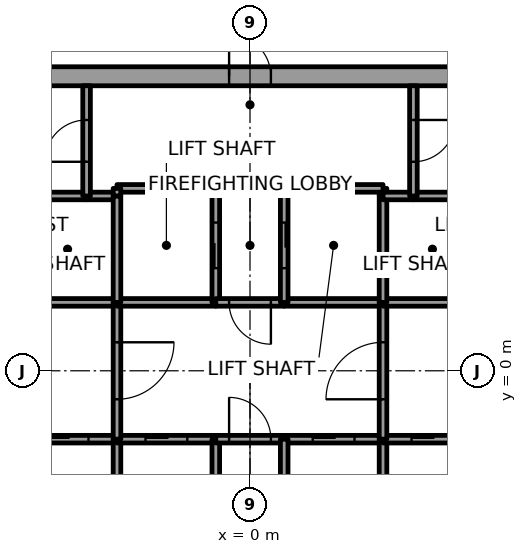
"""IFC4 building model, lengths in metres.
Left out: names, types, materials, properties, quantities, classifications, styles, units other than length and angle.
Written with IfcOpenShell. Run it as: python <this file> out.ifc"""

import sys

from ifc_helpers import new_model, si_unit, direction, frame, frame_2d, origin, place, context, subcontext, project, spatial, rectangle, extrude, element, fill, save


model = new_model("IFC4")
c1 = context("Model", 3, precision=1e-05, world=origin(), true_north=direction((0.0, 1.0)))
c2 = subcontext(c1, "Body", "Model", "MODEL_VIEW")
j1 = project(units=[si_unit("LENGTHUNIT", "METRE"), si_unit("PLANEANGLEUNIT", "RADIAN")], contexts=[c1])
p1 = place(None, origin())
s1 = spatial("IfcSite", under=j1, at=p1, CompositionType="ELEMENT")
p2 = place(p1, origin())
s2 = spatial("IfcBuilding", under=s1, at=p2, CompositionType="ELEMENT")
p3 = place(p2, frame((0.0, 0.0, 73.9)))
s3 = spatial("IfcBuildingStorey", under=s2, at=p3, CompositionType="ELEMENT", Elevation=73.9)
p4 = place(p3, frame((-11.0, 7.75, 0.0), z_axis=(0.0, 0.0, 1.0), x_axis=(1.0, 0.0, 0.0)))
e1 = element("IfcWall", 1, at=p4, inside=s3, PredefinedType="SHEAR", context=c2, shape_type="SweptSolid", body=[
    extrude(rectangle(XDim=22.0, YDim=0.5, at=frame_2d((11.0, 0.0))), origin(), (0.0, 0.0, 1.0), 3.7),
])
p5 = place(p4, frame((10.45, 0.0, 0.0)))
e2 = element("IfcOpeningElement", 2, at=p5, cuts=e1, PredefinedType="OPENING", context=c2, shape_type="SweptSolid", body=[
    extrude(rectangle(XDim=1.1, YDim=2.1, at=frame_2d((0.55, 1.05))), frame((0.0, 0.25, 0.0), z_axis=(0.0, -1.0, 0.0), x_axis=(1.0, 0.0, 0.0)), (0.0, 0.0, 1.0), 0.5),
])
p6 = place(p3, frame((-6.1, -1.8, 0.0), z_axis=(0.0, 0.0, 1.0), x_axis=(1.0, 0.0, 0.0)))
e3 = element("IfcWall", 3, at=p6, inside=s3, PredefinedType="SOLIDWALL", context=c2, shape_type="SweptSolid", body=[
    extrude(rectangle(XDim=2.6, YDim=0.2, at=frame_2d((1.3, 0.0))), origin(), (0.0, 0.0, 1.0), 3.55),
])
p7 = place(p6, frame((0.75, 0.0, 0.0)))
e4 = element("IfcOpeningElement", 4, at=p7, cuts=e3, PredefinedType="OPENING", context=c2, shape_type="SweptSolid", body=[
    extrude(rectangle(XDim=1.1, YDim=2.1, at=frame_2d((0.55, 1.05))), frame((0.0, 0.1, 0.0), z_axis=(0.0, -1.0, 0.0), x_axis=(1.0, 0.0, 0.0)), (0.0, 0.0, 1.0), 0.2),
])
p8 = place(p3, frame((-3.5, 1.8, 0.0), z_axis=(0.0, 0.0, 1.0), x_axis=(-1.0, 0.0, 0.0)))
e5 = element("IfcWall", 5, at=p8, inside=s3, PredefinedType="SOLIDWALL", context=c2, shape_type="SweptSolid", body=[
    extrude(rectangle(XDim=2.6, YDim=0.2, at=frame_2d((1.3, 0.0))), origin(), (0.0, 0.0, 1.0), 3.55),
])
p9 = place(p3, frame((-4.3, 4.6, 0.0), z_axis=(0.0, 0.0, 1.0), x_axis=(-1.0, 0.0, 0.0)))
e6 = element("IfcWall", 6, at=p9, inside=s3, PredefinedType="SOLIDWALL", context=c2, shape_type="SweptSolid", body=[
    extrude(rectangle(XDim=1.8, YDim=0.2, at=frame_2d((0.9, 0.0))), origin(), (0.0, 0.0, 1.0), 3.55),
])
p10 = place(p3, frame((-3.5, 4.6, 0.0), z_axis=(0.0, 0.0, 1.0), x_axis=(-1.0, 0.0, 0.0)))
e7 = element("IfcWall", 7, at=p10, inside=s3, PredefinedType="SOLIDWALL", context=c2, shape_type="SweptSolid", body=[
    extrude(rectangle(XDim=0.8, YDim=0.2, at=frame_2d((0.4, 0.0))), origin(), (0.0, 0.0, 1.0), 3.55),
])
p11 = place(p3, frame((-4.3, 4.6, 0.0), z_axis=(0.0, 0.0, 1.0), x_axis=(0.0, 1.0, 0.0)))
e8 = element("IfcWall", 8, at=p11, inside=s3, PredefinedType="SOLIDWALL", context=c2, shape_type="SweptSolid", body=[
    extrude(rectangle(XDim=2.9, YDim=0.2, at=frame_2d((1.45, 0.0))), origin(), (0.0, 0.0, 1.0), 3.55),
])
p12 = place(p11, frame((0.9, 0.0, 0.0)))
e9 = element("IfcOpeningElement", 9, at=p12, cuts=e8, PredefinedType="OPENING", context=c2, shape_type="SweptSolid", body=[
    extrude(rectangle(XDim=1.1, YDim=2.1, at=frame_2d((0.55, 1.05))), frame((0.0, 0.1, 0.0), z_axis=(0.0, -1.0, 0.0), x_axis=(1.0, 0.0, 0.0)), (0.0, 0.0, 1.0), 0.2),
])
p13 = place(p3, frame((-3.5, -4.6, 0.0), z_axis=(0.0, 0.0, 1.0), x_axis=(0.0, 1.0, 0.0)))
e10 = element("IfcWall", 10, at=p13, inside=s3, PredefinedType="SOLIDWALL", context=c2, shape_type="SweptSolid", body=[
    extrude(rectangle(XDim=2.8, YDim=0.2, at=frame_2d((1.4, 0.0))), origin(), (0.0, 0.0, 1.0), 3.55),
])
p14 = place(p3, frame((-3.5, -1.8, 0.0), z_axis=(0.0, 0.0, 1.0), x_axis=(1.0, 0.0, 0.0)))
e11 = element("IfcWall", 11, at=p14, inside=s3, PredefinedType="SOLIDWALL", context=c2, shape_type="SweptSolid", body=[
    extrude(rectangle(XDim=2.6, YDim=0.2, at=frame_2d((1.3, 0.0))), origin(), (0.0, 0.0, 1.0), 3.55),
])
p15 = place(p14, frame((0.75, 0.0, 0.0)))
e12 = element("IfcOpeningElement", 12, at=p15, cuts=e11, PredefinedType="OPENING", context=c2, shape_type="SweptSolid", body=[
    extrude(rectangle(XDim=1.1, YDim=2.1, at=frame_2d((0.55, 1.05))), frame((0.0, 0.1, 0.0), z_axis=(0.0, -1.0, 0.0), x_axis=(1.0, 0.0, 0.0)), (0.0, 0.0, 1.0), 0.2),
])
p16 = place(p3, frame((-3.5, 1.8, 0.0), z_axis=(0.0, 0.0, 1.0), x_axis=(0.0, -1.0, 0.0)))
e13 = element("IfcWall", 13, at=p16, inside=s3, PredefinedType="SOLIDWALL", context=c2, shape_type="SweptSolid", body=[
    extrude(rectangle(XDim=3.6, YDim=0.2, at=frame_2d((1.8, 0.0))), origin(), (0.0, 0.0, 1.0), 3.55),
])
p17 = place(p16, frame((1.05, 0.0, 0.0)))
e14 = element("IfcOpeningElement", 14, at=p17, cuts=e13, PredefinedType="OPENING", context=c2, shape_type="SweptSolid", body=[
    extrude(rectangle(XDim=1.5, YDim=2.1, at=frame_2d((0.75, 1.05))), frame((0.0, 0.1, 0.0), z_axis=(0.0, -1.0, 0.0), x_axis=(1.0, 0.0, 0.0)), (0.0, 0.0, 1.0), 0.2),
])
p18 = place(p3, frame((-0.9, 1.8, 0.0), z_axis=(0.0, 0.0, 1.0), x_axis=(-1.0, 0.0, 0.0)))
e15 = element("IfcWall", 15, at=p18, inside=s3, PredefinedType="SOLIDWALL", context=c2, shape_type="SweptSolid", body=[
    extrude(rectangle(XDim=2.6, YDim=0.2, at=frame_2d((1.3, 0.0))), origin(), (0.0, 0.0, 1.0), 3.55),
])
p19 = place(p3, frame((-3.5, 4.6, 0.0), z_axis=(0.0, 0.0, 1.0), x_axis=(0.0, -1.0, 0.0)))
e16 = element("IfcWall", 16, at=p19, inside=s3, PredefinedType="SOLIDWALL", context=c2, shape_type="SweptSolid", body=[
    extrude(rectangle(XDim=2.8, YDim=0.2, at=frame_2d((1.4, 0.0))), origin(), (0.0, 0.0, 1.0), 3.55),
])
p20 = place(p3, frame((-0.9, 1.8, 0.0), z_axis=(0.0, 0.0, 1.0), x_axis=(0.0, 1.0, 0.0)))
e17 = element("IfcWall", 17, at=p20, inside=s3, PredefinedType="SOLIDWALL", context=c2, shape_type="SweptSolid", body=[
    extrude(rectangle(XDim=3.0, YDim=0.2, at=frame_2d((1.5, 0.0))), origin(), (0.0, 0.0, 1.0), 3.55),
])
p21 = place(p20, frame((0.9, 0.0, 0.0)))
e18 = element("IfcOpeningElement", 18, at=p21, cuts=e17, PredefinedType="OPENING", context=c2, shape_type="SweptSolid", body=[
    extrude(rectangle(XDim=1.2, YDim=2.1, at=frame_2d((0.6, 1.05))), frame((0.0, 0.1, 0.0), z_axis=(0.0, -1.0, 0.0), x_axis=(1.0, 0.0, 0.0)), (0.0, 0.0, 1.0), 0.2),
])
p22 = place(p3, frame((-0.9, 4.8, 0.0), z_axis=(0.0, 0.0, 1.0), x_axis=(-1.0, 0.0, 0.0)))
e19 = element("IfcWall", 19, at=p22, inside=s3, PredefinedType="SOLIDWALL", context=c2, shape_type="SweptSolid", body=[
    extrude(rectangle(XDim=2.6, YDim=0.2, at=frame_2d((1.3, 0.0))), origin(), (0.0, 0.0, 1.0), 3.55),
])
p23 = place(p3, frame((-3.5, 4.8, 0.0), z_axis=(0.0, 0.0, 1.0), x_axis=(0.0, -1.0, 0.0)))
e20 = element("IfcWall", 20, at=p23, inside=s3, PredefinedType="SOLIDWALL", context=c2, shape_type="SweptSolid", body=[
    extrude(rectangle(XDim=0.2, YDim=0.2, at=frame_2d((0.1, 0.0))), origin(), (0.0, 0.0, 1.0), 3.55),
])
p24 = place(p3, frame((-0.9, -4.6, 0.0), z_axis=(0.0, 0.0, 1.0), x_axis=(0.0, 1.0, 0.0)))
e21 = element("IfcWall", 21, at=p24, inside=s3, PredefinedType="SOLIDWALL", context=c2, shape_type="SweptSolid", body=[
    extrude(rectangle(XDim=2.8, YDim=0.2, at=frame_2d((1.4, 0.0))), origin(), (0.0, 0.0, 1.0), 3.55),
])
p25 = place(p3, frame((-0.9, -1.8, 0.0), z_axis=(0.0, 0.0, 1.0), x_axis=(1.0, 0.0, 0.0)))
e22 = element("IfcWall", 22, at=p25, inside=s3, PredefinedType="SOLIDWALL", context=c2, shape_type="SweptSolid", body=[
    extrude(rectangle(XDim=1.8, YDim=0.2, at=frame_2d((0.9, 0.0))), origin(), (0.0, 0.0, 1.0), 3.55),
])
p26 = place(p25, frame((0.35, 0.0, 0.0)))
e23 = element("IfcOpeningElement", 23, at=p26, cuts=e22, PredefinedType="OPENING", context=c2, shape_type="SweptSolid", body=[
    extrude(rectangle(XDim=1.1, YDim=2.1, at=frame_2d((0.55, 1.05))), frame((0.0, 0.1, 0.0), z_axis=(0.0, -1.0, 0.0), x_axis=(1.0, 0.0, 0.0)), (0.0, 0.0, 1.0), 0.2),
])
p27 = place(p3, frame((0.9, 1.8, 0.0), z_axis=(0.0, 0.0, 1.0), x_axis=(-1.0, 0.0, 0.0)))
e24 = element("IfcWall", 24, at=p27, inside=s3, PredefinedType="SOLIDWALL", context=c2, shape_type="SweptSolid", body=[
    extrude(rectangle(XDim=1.8, YDim=0.2, at=frame_2d((0.9, 0.0))), origin(), (0.0, 0.0, 1.0), 3.55),
])
p28 = place(p27, frame((0.35, 0.0, 0.0)))
e25 = element("IfcOpeningElement", 25, at=p28, cuts=e24, PredefinedType="OPENING", context=c2, shape_type="SweptSolid", body=[
    extrude(rectangle(XDim=1.1, YDim=2.1, at=frame_2d((0.55, 1.05))), frame((0.0, 0.1, 0.0), z_axis=(0.0, -1.0, 0.0), x_axis=(1.0, 0.0, 0.0)), (0.0, 0.0, 1.0), 0.2),
])
p29 = place(p3, frame((0.9, -1.8, 0.0), z_axis=(0.0, 0.0, 1.0), x_axis=(1.0, 0.0, 0.0)))
e26 = element("IfcWall", 26, at=p29, inside=s3, PredefinedType="SOLIDWALL", context=c2, shape_type="SweptSolid", body=[
    extrude(rectangle(XDim=2.6, YDim=0.2, at=frame_2d((1.3, 0.0))), origin(), (0.0, 0.0, 1.0), 3.55),
])
p30 = place(p29, frame((0.75, 0.0, 0.0)))
e27 = element("IfcOpeningElement", 27, at=p30, cuts=e26, PredefinedType="OPENING", context=c2, shape_type="SweptSolid", body=[
    extrude(rectangle(XDim=1.1, YDim=2.1, at=frame_2d((0.55, 1.05))), frame((0.0, 0.1, 0.0), z_axis=(0.0, -1.0, 0.0), x_axis=(1.0, 0.0, 0.0)), (0.0, 0.0, 1.0), 0.2),
])
p31 = place(p3, frame((0.9, -1.8, 0.0), z_axis=(0.0, 0.0, 1.0), x_axis=(0.0, -1.0, 0.0)))
e28 = element("IfcWall", 28, at=p31, inside=s3, PredefinedType="SOLIDWALL", context=c2, shape_type="SweptSolid", body=[
    extrude(rectangle(XDim=2.8, YDim=0.2, at=frame_2d((1.4, 0.0))), origin(), (0.0, 0.0, 1.0), 3.55),
])
p32 = place(p3, frame((3.5, 1.8, 0.0), z_axis=(0.0, 0.0, 1.0), x_axis=(-1.0, 0.0, 0.0)))
e29 = element("IfcWall", 29, at=p32, inside=s3, PredefinedType="SOLIDWALL", context=c2, shape_type="SweptSolid", body=[
    extrude(rectangle(XDim=2.6, YDim=0.2, at=frame_2d((1.3, 0.0))), origin(), (0.0, 0.0, 1.0), 3.55),
])
p33 = place(p3, frame((3.5, 4.6, 0.0), z_axis=(0.0, 0.0, 1.0), x_axis=(0.0, 1.0, 0.0)))
e30 = element("IfcWall", 30, at=p33, inside=s3, PredefinedType="SOLIDWALL", context=c2, shape_type="SweptSolid", body=[
    extrude(rectangle(XDim=0.2, YDim=0.2, at=frame_2d((0.1, 0.0))), origin(), (0.0, 0.0, 1.0), 3.55),
])
p34 = place(p3, frame((3.5, 4.8, 0.0), z_axis=(0.0, 0.0, 1.0), x_axis=(-1.0, 0.0, 0.0)))
e31 = element("IfcWall", 31, at=p34, inside=s3, PredefinedType="SOLIDWALL", context=c2, shape_type="SweptSolid", body=[
    extrude(rectangle(XDim=2.6, YDim=0.2, at=frame_2d((1.3, 0.0))), origin(), (0.0, 0.0, 1.0), 3.55),
])
p35 = place(p3, frame((0.9, 4.8, 0.0), z_axis=(0.0, 0.0, 1.0), x_axis=(0.0, -1.0, 0.0)))
e32 = element("IfcWall", 32, at=p35, inside=s3, PredefinedType="SOLIDWALL", context=c2, shape_type="SweptSolid", body=[
    extrude(rectangle(XDim=3.0, YDim=0.2, at=frame_2d((1.5, 0.0))), origin(), (0.0, 0.0, 1.0), 3.55),
])
p36 = place(p35, frame((0.9, 0.0, 0.0)))
e33 = element("IfcOpeningElement", 33, at=p36, cuts=e32, PredefinedType="OPENING", context=c2, shape_type="SweptSolid", body=[
    extrude(rectangle(XDim=1.2, YDim=2.1, at=frame_2d((0.6, 1.05))), frame((0.0, 0.1, 0.0), z_axis=(0.0, -1.0, 0.0), x_axis=(1.0, 0.0, 0.0)), (0.0, 0.0, 1.0), 0.2),
])
p37 = place(p3, frame((3.5, -4.6, 0.0), z_axis=(0.0, 0.0, 1.0), x_axis=(0.0, 1.0, 0.0)))
e34 = element("IfcWall", 34, at=p37, inside=s3, PredefinedType="SOLIDWALL", context=c2, shape_type="SweptSolid", body=[
    extrude(rectangle(XDim=2.8, YDim=0.2, at=frame_2d((1.4, 0.0))), origin(), (0.0, 0.0, 1.0), 3.55),
])
p38 = place(p3, frame((3.5, -1.8, 0.0), z_axis=(0.0, 0.0, 1.0), x_axis=(1.0, 0.0, 0.0)))
e35 = element("IfcWall", 35, at=p38, inside=s3, PredefinedType="SOLIDWALL", context=c2, shape_type="SweptSolid", body=[
    extrude(rectangle(XDim=2.6, YDim=0.2, at=frame_2d((1.3, 0.0))), origin(), (0.0, 0.0, 1.0), 3.55),
])
p39 = place(p38, frame((0.75, 0.0, 0.0)))
e36 = element("IfcOpeningElement", 36, at=p39, cuts=e35, PredefinedType="OPENING", context=c2, shape_type="SweptSolid", body=[
    extrude(rectangle(XDim=1.1, YDim=2.1, at=frame_2d((0.55, 1.05))), frame((0.0, 0.1, 0.0), z_axis=(0.0, -1.0, 0.0), x_axis=(1.0, 0.0, 0.0)), (0.0, 0.0, 1.0), 0.2),
])
p40 = place(p3, frame((3.5, -1.8, 0.0), z_axis=(0.0, 0.0, 1.0), x_axis=(0.0, 1.0, 0.0)))
e37 = element("IfcWall", 37, at=p40, inside=s3, PredefinedType="SOLIDWALL", context=c2, shape_type="SweptSolid", body=[
    extrude(rectangle(XDim=3.6, YDim=0.2, at=frame_2d((1.8, 0.0))), origin(), (0.0, 0.0, 1.0), 3.55),
])
p41 = place(p40, frame((1.05, 0.0, 0.0)))
e38 = element("IfcOpeningElement", 38, at=p41, cuts=e37, PredefinedType="OPENING", context=c2, shape_type="SweptSolid", body=[
    extrude(rectangle(XDim=1.5, YDim=2.1, at=frame_2d((0.75, 1.05))), frame((0.0, 0.1, 0.0), z_axis=(0.0, -1.0, 0.0), x_axis=(1.0, 0.0, 0.0)), (0.0, 0.0, 1.0), 0.2),
])
p42 = place(p3, frame((6.1, 1.8, 0.0), z_axis=(0.0, 0.0, 1.0), x_axis=(-1.0, 0.0, 0.0)))
e39 = element("IfcWall", 39, at=p42, inside=s3, PredefinedType="SOLIDWALL", context=c2, shape_type="SweptSolid", body=[
    extrude(rectangle(XDim=2.6, YDim=0.2, at=frame_2d((1.3, 0.0))), origin(), (0.0, 0.0, 1.0), 3.55),
])
p43 = place(p3, frame((3.5, 1.8, 0.0), z_axis=(0.0, 0.0, 1.0), x_axis=(0.0, 1.0, 0.0)))
e40 = element("IfcWall", 40, at=p43, inside=s3, PredefinedType="SOLIDWALL", context=c2, shape_type="SweptSolid", body=[
    extrude(rectangle(XDim=2.8, YDim=0.2, at=frame_2d((1.4, 0.0))), origin(), (0.0, 0.0, 1.0), 3.55),
])
p44 = place(p3, frame((4.3, 4.6, 0.0), z_axis=(0.0, 0.0, 1.0), x_axis=(-1.0, 0.0, 0.0)))
e41 = element("IfcWall", 41, at=p44, inside=s3, PredefinedType="SOLIDWALL", context=c2, shape_type="SweptSolid", body=[
    extrude(rectangle(XDim=0.8, YDim=0.2, at=frame_2d((0.4, 0.0))), origin(), (0.0, 0.0, 1.0), 3.55),
])
p45 = place(p3, frame((6.1, 4.6, 0.0), z_axis=(0.0, 0.0, 1.0), x_axis=(-1.0, 0.0, 0.0)))
e42 = element("IfcWall", 42, at=p45, inside=s3, PredefinedType="SOLIDWALL", context=c2, shape_type="SweptSolid", body=[
    extrude(rectangle(XDim=1.8, YDim=0.2, at=frame_2d((0.9, 0.0))), origin(), (0.0, 0.0, 1.0), 3.55),
])
p46 = place(p3, frame((4.3, 7.5, 0.0), z_axis=(0.0, 0.0, 1.0), x_axis=(0.0, -1.0, 0.0)))
e43 = element("IfcWall", 43, at=p46, inside=s3, PredefinedType="SOLIDWALL", context=c2, shape_type="SweptSolid", body=[
    extrude(rectangle(XDim=2.9, YDim=0.2, at=frame_2d((1.45, 0.0))), origin(), (0.0, 0.0, 1.0), 3.55),
])
p47 = place(p46, frame((0.9, 0.0, 0.0)))
e44 = element("IfcOpeningElement", 44, at=p47, cuts=e43, PredefinedType="OPENING", context=c2, shape_type="SweptSolid", body=[
    extrude(rectangle(XDim=1.1, YDim=2.1, at=frame_2d((0.55, 1.05))), frame((0.0, 0.1, 0.0), z_axis=(0.0, -1.0, 0.0), x_axis=(1.0, 0.0, 0.0)), (0.0, 0.0, 1.0), 0.2),
])
p48 = place(p7, origin())
e45 = element("IfcDoor", 45, at=p48, inside=s3, OperationType="SLIDING_TO_LEFT", PredefinedType="DOOR", context=c2, shape_type="SweptSolid", body=[
    extrude(rectangle(XDim=1.1, YDim=2.1, at=frame_2d((0.55, 1.05))), frame((0.0, 0.025, 0.0), z_axis=(0.0, -1.0, 0.0), x_axis=(1.0, 0.0, 0.0)), (0.0, 0.0, 1.0), 0.05),
])
fill(e4, e45)
p49 = place(p15, origin())
e46 = element("IfcDoor", 46, at=p49, inside=s3, OperationType="SLIDING_TO_LEFT", PredefinedType="DOOR", context=c2, shape_type="SweptSolid", body=[
    extrude(rectangle(XDim=1.1, YDim=2.1, at=frame_2d((0.55, 1.05))), frame((0.0, 0.025, 0.0), z_axis=(0.0, -1.0, 0.0), x_axis=(1.0, 0.0, 0.0)), (0.0, 0.0, 1.0), 0.05),
])
fill(e12, e46)
p50 = place(p30, origin())
e47 = element("IfcDoor", 47, at=p50, inside=s3, OperationType="SLIDING_TO_LEFT", PredefinedType="DOOR", context=c2, shape_type="SweptSolid", body=[
    extrude(rectangle(XDim=1.1, YDim=2.1, at=frame_2d((0.55, 1.05))), frame((0.0, 0.025, 0.0), z_axis=(0.0, -1.0, 0.0), x_axis=(1.0, 0.0, 0.0)), (0.0, 0.0, 1.0), 0.05),
])
fill(e27, e47)
p51 = place(p39, origin())
e48 = element("IfcDoor", 48, at=p51, inside=s3, OperationType="SLIDING_TO_RIGHT", PredefinedType="DOOR", context=c2, shape_type="SweptSolid", body=[
    extrude(rectangle(XDim=1.1, YDim=2.1, at=frame_2d((0.55, 1.05))), frame((0.0, 0.025, 0.0), z_axis=(0.0, -1.0, 0.0), x_axis=(1.0, 0.0, 0.0)), (0.0, 0.0, 1.0), 0.05),
])
fill(e36, e48)
p52 = place(p21, origin())
e49 = element("IfcDoor", 49, at=p52, inside=s3, OperationType="SLIDING_TO_RIGHT", PredefinedType="DOOR", context=c2, shape_type="SweptSolid", body=[
    extrude(rectangle(XDim=1.2, YDim=2.1, at=frame_2d((0.6, 1.05))), frame((0.0, 0.025, 0.0), z_axis=(0.0, -1.0, 0.0), x_axis=(1.0, 0.0, 0.0)), (0.0, 0.0, 1.0), 0.05),
])
fill(e18, e49)
p53 = place(p36, origin())
e50 = element("IfcDoor", 50, at=p53, inside=s3, OperationType="SLIDING_TO_LEFT", PredefinedType="DOOR", context=c2, shape_type="SweptSolid", body=[
    extrude(rectangle(XDim=1.2, YDim=2.1, at=frame_2d((0.6, 1.05))), frame((0.0, 0.025, 0.0), z_axis=(0.0, -1.0, 0.0), x_axis=(1.0, 0.0, 0.0)), (0.0, 0.0, 1.0), 0.05),
])
fill(e33, e50)
p54 = place(p17, origin())
e51 = element("IfcDoor", 51, at=p54, inside=s3, OperationType="DOUBLE_DOOR_SINGLE_SWING", PredefinedType="DOOR", context=c2, shape_type="SweptSolid", body=[
    extrude(rectangle(XDim=1.5, YDim=2.1, at=frame_2d((0.75, 1.05))), frame((0.0, 0.025, 0.0), z_axis=(0.0, -1.0, 0.0), x_axis=(1.0, 0.0, 0.0)), (0.0, 0.0, 1.0), 0.05),
])
fill(e14, e51)
p55 = place(p41, origin())
e52 = element("IfcDoor", 52, at=p55, inside=s3, OperationType="DOUBLE_DOOR_SINGLE_SWING", PredefinedType="DOOR", context=c2, shape_type="SweptSolid", body=[
    extrude(rectangle(XDim=1.5, YDim=2.1, at=frame_2d((0.75, 1.05))), frame((0.0, 0.025, 0.0), z_axis=(0.0, -1.0, 0.0), x_axis=(1.0, 0.0, 0.0)), (0.0, 0.0, 1.0), 0.05),
])
fill(e38, e52)
p56 = place(p28, origin())
e53 = element("IfcDoor", 53, at=p56, inside=s3, OperationType="SINGLE_SWING_RIGHT", PredefinedType="DOOR", context=c2, shape_type="SweptSolid", body=[
    extrude(rectangle(XDim=1.1, YDim=2.1, at=frame_2d((0.55, 1.05))), frame((0.0, 0.025, 0.0), z_axis=(0.0, -1.0, 0.0), x_axis=(1.0, 0.0, 0.0)), (0.0, 0.0, 1.0), 0.05),
])
fill(e25, e53)
p57 = place(p26, origin())
e54 = element("IfcDoor", 54, at=p57, inside=s3, OperationType="SINGLE_SWING_RIGHT", PredefinedType="DOOR", context=c2, shape_type="SweptSolid", body=[
    extrude(rectangle(XDim=1.1, YDim=2.1, at=frame_2d((0.55, 1.05))), frame((0.0, 0.025, 0.0), z_axis=(0.0, -1.0, 0.0), x_axis=(1.0, 0.0, 0.0)), (0.0, 0.0, 1.0), 0.05),
])
fill(e23, e54)
p58 = place(p12, origin())
e55 = element("IfcDoor", 55, at=p58, inside=s3, OperationType="SINGLE_SWING_RIGHT", PredefinedType="DOOR", context=c2, shape_type="SweptSolid", body=[
    extrude(rectangle(XDim=1.1, YDim=2.1, at=frame_2d((0.55, 1.05))), frame((0.0, 0.025, 0.0), z_axis=(0.0, -1.0, 0.0), x_axis=(1.0, 0.0, 0.0)), (0.0, 0.0, 1.0), 0.05),
])
fill(e9, e55)
p59 = place(p47, origin())
e56 = element("IfcDoor", 56, at=p59, inside=s3, OperationType="SINGLE_SWING_LEFT", PredefinedType="DOOR", context=c2, shape_type="SweptSolid", body=[
    extrude(rectangle(XDim=1.1, YDim=2.1, at=frame_2d((0.55, 1.05))), frame((0.0, 0.025, 0.0), z_axis=(0.0, -1.0, 0.0), x_axis=(1.0, 0.0, 0.0)), (0.0, 0.0, 1.0), 0.05),
])
fill(e44, e56)
p60 = place(p5, origin())
e57 = element("IfcDoor", 57, at=p60, inside=s3, OperationType="SINGLE_SWING_RIGHT", PredefinedType="DOOR", context=c2, shape_type="SweptSolid", body=[
    extrude(rectangle(XDim=1.1, YDim=2.1, at=frame_2d((0.55, 1.05))), frame((0.0, 0.025, 0.0), z_axis=(0.0, -1.0, 0.0), x_axis=(1.0, 0.0, 0.0)), (0.0, 0.0, 1.0), 0.05),
])
fill(e2, e57)
save(model, sys.argv[1])
